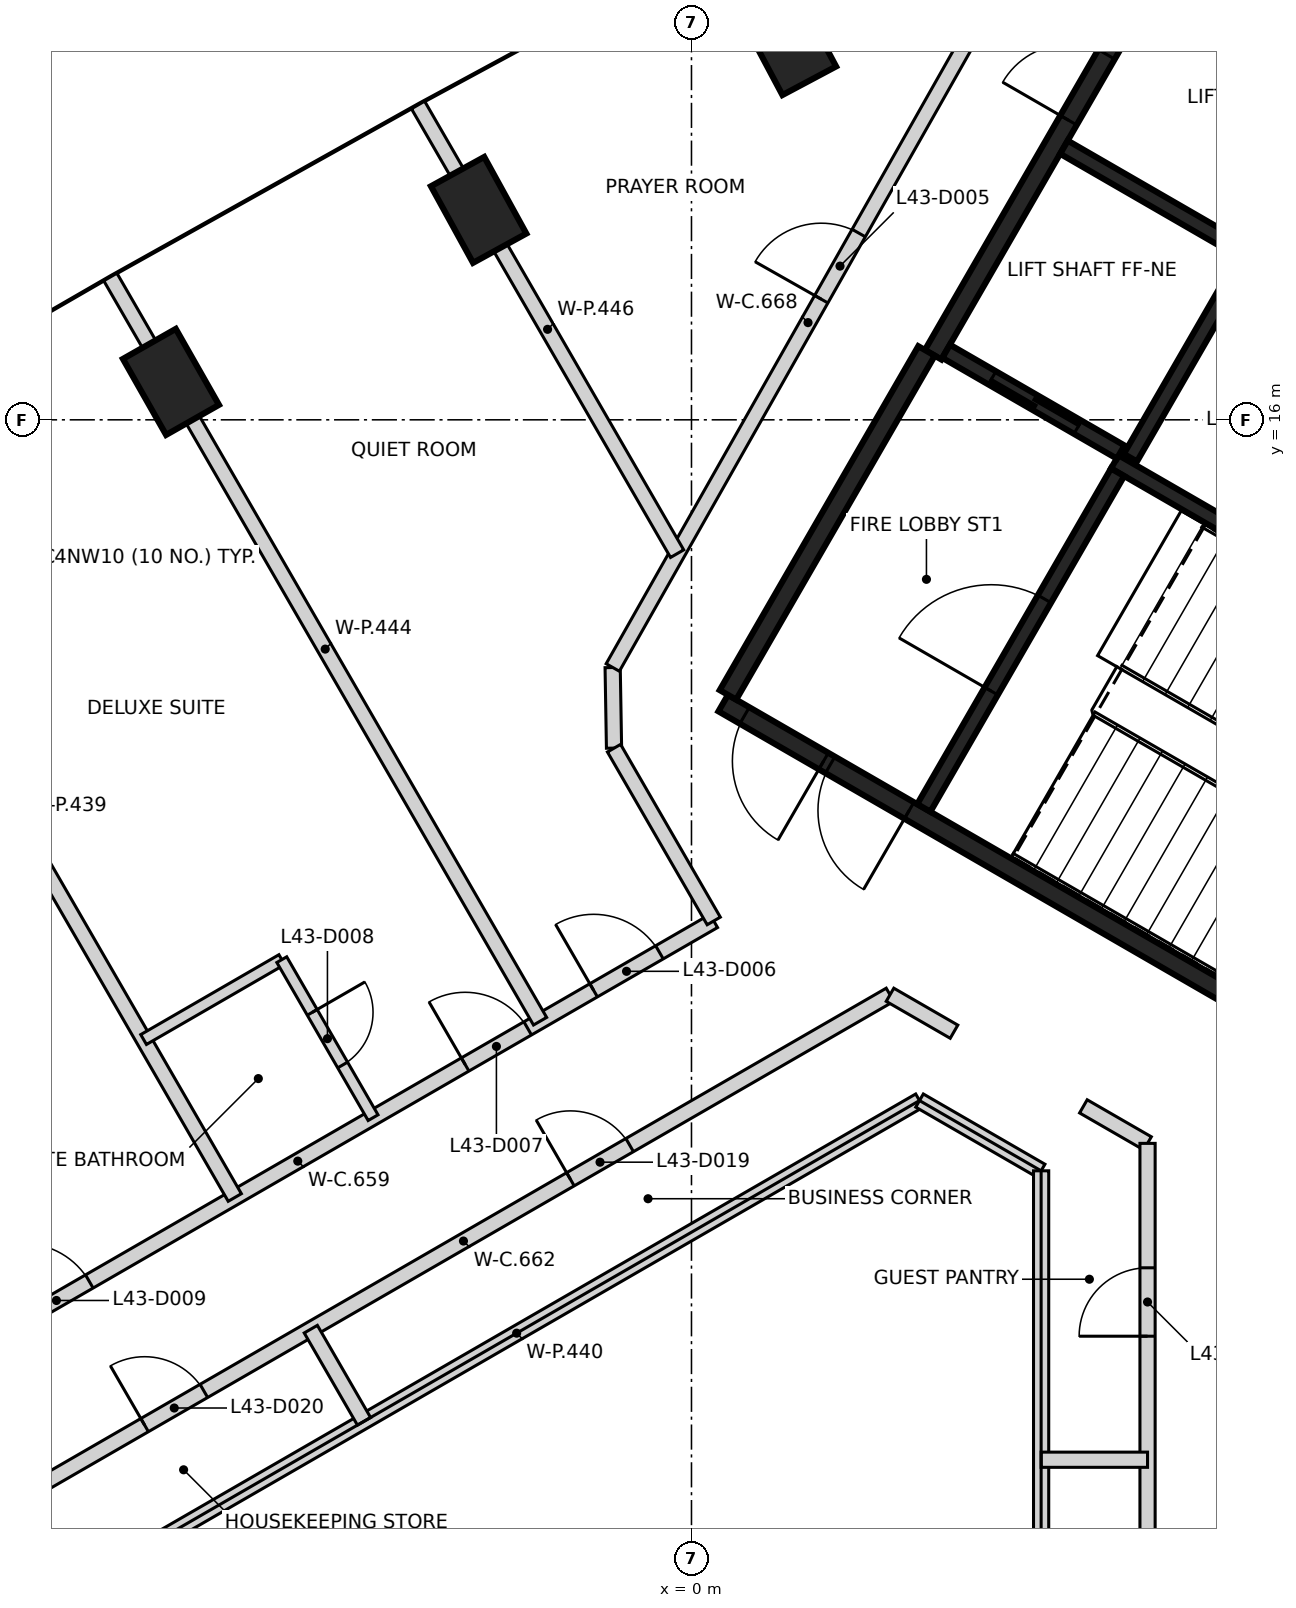
"""IFC4 building model, lengths in metres.
Left out: names, types, materials, properties, quantities, classifications, styles, units other than length and angle.
Written with IfcOpenShell. Run it as: python <this file> out.ifc"""

import sys

from ifc_helpers import new_model, si_unit, direction, frame, frame_2d, origin, origin_2d, place, context, subcontext, project, spatial, rectangle, extrude, element, fill, save


model = new_model("IFC4")
c1 = context("Model", 3, precision=1e-05, world=origin(), true_north=direction((0.0, 1.0)))
c2 = subcontext(c1, "Body", "Model", "MODEL_VIEW")
j1 = project(units=[si_unit("LENGTHUNIT", "METRE"), si_unit("PLANEANGLEUNIT", "RADIAN")], contexts=[c1])
p1 = place(None, origin())
s1 = spatial("IfcSite", under=j1, at=p1, CompositionType="ELEMENT")
p2 = place(p1, origin())
s2 = spatial("IfcBuilding", under=s1, at=p2, CompositionType="ELEMENT")
p3 = place(p2, frame((0.0, 0.0, 175.6)))
s3 = spatial("IfcBuildingStorey", under=s2, at=p3, CompositionType="ELEMENT", Elevation=175.6)
for number, where, z_axis, x_axis in (
    (1, (1.279, 20.968, -0.35), (0.0, 0.0, 1.0), (-0.47, 0.883, 0.0)),
    (2, (-2.8, 18.762, -0.35), (0.0, 0.0, 1.0), (-0.482, 0.876, 0.0)),
    (3, (-6.848, 16.499, -0.35), (0.0, 0.0, 1.0), (-0.494, 0.87, 0.0)),
):
    element("IfcColumn", number, at=place(p3, frame(where, z_axis=z_axis, x_axis=x_axis)), inside=s3, PredefinedType="COLUMN", context=c2, shape_type="SweptSolid", body=[
        extrude(rectangle(XDim=1.15, YDim=0.8, at=origin_2d()), origin(), (0.0, 0.0, 1.0), 3.6),
    ])
p4 = place(p3, frame((10.42, 6.498, 0.0), z_axis=(0.0, 0.0, 1.0), x_axis=(-0.866021906294, 0.500006057782, 0.0)))
e4 = element("IfcWall", 4, at=p4, inside=s3, PredefinedType="SHEAR", context=c2, shape_type="SweptSolid", body=[
    extrude(rectangle(XDim=11.55, YDim=0.25, at=frame_2d((5.775, 0.0))), origin(), (0.0, 0.0, 1.0), 3.25),
])
p5 = place(p4, frame((10.025, 0.0, 0.0)))
e5 = element("IfcOpeningElement", 5, at=p5, cuts=e4, PredefinedType="OPENING", context=c2, shape_type="SweptSolid", body=[
    extrude(rectangle(XDim=1.2, YDim=2.1, at=frame_2d((0.6, 1.05))), frame((0.0, 0.135, 0.0), z_axis=(0.0, -1.0, 0.0), x_axis=(1.0, 0.0, 0.0)), (0.0, 0.0, 1.0), 0.27),
])
p6 = place(p4, frame((8.725, 0.0, 0.0)))
e6 = element("IfcOpeningElement", 6, at=p6, cuts=e4, PredefinedType="OPENING", context=c2, shape_type="SweptSolid", body=[
    extrude(rectangle(XDim=1.2, YDim=2.1, at=frame_2d((0.6, 1.05))), frame((0.0, 0.135, 0.0), z_axis=(0.0, -1.0, 0.0), x_axis=(1.0, 0.0, 0.0)), (0.0, 0.0, 1.0), 0.27),
])
p7 = place(p3, frame((3.179, 16.856, 0.0), z_axis=(0.0, 0.0, 1.0), x_axis=(0.500004234368, 0.866022959057, 0.0)))
e7 = element("IfcWall", 7, at=p7, inside=s3, PredefinedType="SHEAR", context=c2, shape_type="SweptSolid", body=[
    extrude(rectangle(XDim=6.25, YDim=0.25, at=frame_2d((3.125, 0.0))), origin(), (0.0, 0.0, 1.0), 3.25),
])
p8 = place(p7, frame((3.563, 0.0, 0.0)))
e8 = element("IfcOpeningElement", 8, at=p8, cuts=e7, PredefinedType="OPENING", context=c2, shape_type="SweptSolid", body=[
    extrude(rectangle(XDim=1.0, YDim=2.1, at=frame_2d((0.5, 1.05))), frame((0.0, 0.135, 0.0), z_axis=(0.0, -1.0, 0.0), x_axis=(1.0, 0.0, 0.0)), (0.0, 0.0, 1.0), 0.27),
])
p9 = place(p3, frame((0.48, 12.381, 0.0), z_axis=(0.0, 0.0, 1.0), x_axis=(0.49999885962, 0.866026062182, 0.0)))
e9 = element("IfcWall", 9, at=p9, inside=s3, PredefinedType="SHEAR", context=c2, shape_type="SweptSolid", body=[
    extrude(rectangle(XDim=5.225, YDim=0.25, at=frame_2d((2.612, 0.0))), origin(), (0.0, 0.0, 1.0), 3.25),
])
p10 = place(p3, frame((10.636, 12.521, 0.0), z_axis=(0.0, 0.0, 1.0), x_axis=(-0.866013252188, 0.500021046592, 0.0)))
e10 = element("IfcWall", 10, at=p10, inside=s3, PredefinedType="SHEAR", context=c2, shape_type="SweptSolid", body=[
    extrude(rectangle(XDim=5.851, YDim=0.2, at=frame_2d((2.925, 0.0))), origin(), (0.0, 0.0, 1.0), 3.25),
])
p11 = place(p3, frame((3.057, 10.895, 0.0), z_axis=(0.0, 0.0, 1.0), x_axis=(0.500027839223, 0.866009330205, 0.0)))
e11 = element("IfcWall", 11, at=p11, inside=s3, PredefinedType="SHEAR", context=c2, shape_type="SweptSolid", body=[
    extrude(rectangle(XDim=5.098, YDim=0.2, at=frame_2d((2.549, 0.0))), origin(), (0.0, 0.0, 1.0), 3.25),
])
p12 = place(p11, frame((1.774, 0.0, 0.0)))
e12 = element("IfcOpeningElement", 12, at=p12, cuts=e11, PredefinedType="OPENING", context=c2, shape_type="SweptSolid", body=[
    extrude(rectangle(XDim=1.4, YDim=2.1, at=frame_2d((0.7, 1.05))), frame((0.0, 0.11, 0.0), z_axis=(0.0, -1.0, 0.0), x_axis=(1.0, 0.0, 0.0)), (0.0, 0.0, 1.0), 0.22),
])
p13 = place(p3, frame((7.324, 18.187, 0.0), z_axis=(0.0, 0.0, 1.0), x_axis=(-0.499967891604, -0.866043940782, 0.0)))
e13 = element("IfcWall", 13, at=p13, inside=s3, PredefinedType="SHEAR", context=c2, shape_type="SweptSolid", body=[
    extrude(rectangle(XDim=3.1, YDim=0.2, at=frame_2d((1.55, 0.0))), origin(), (0.0, 0.0, 1.0), 3.25),
])
p14 = place(p3, frame((5.646, 15.576, 0.0), z_axis=(0.0, 0.0, 1.0), x_axis=(-0.866018407898, 0.500012117035, 0.0)))
e14 = element("IfcWall", 14, at=p14, inside=s3, PredefinedType="SHEAR", context=c2, shape_type="SweptSolid", body=[
    extrude(rectangle(XDim=2.651, YDim=0.2, at=frame_2d((1.325, 0.0))), origin(), (0.0, 0.0, 1.0), 3.25),
])
p15 = place(p14, frame((0.652, 0.0, 0.0)))
e15 = element("IfcOpeningElement", 15, at=p15, cuts=e14, PredefinedType="OPENING", context=c2, shape_type="SweptSolid", body=[
    extrude(rectangle(XDim=1.3, YDim=2.1, at=frame_2d((0.65, 1.05))), frame((0.0, 0.11, 0.0), z_axis=(0.0, -1.0, 0.0), x_axis=(1.0, 0.0, 0.0)), (0.0, 0.0, 1.0), 0.22),
])
p16 = place(p3, frame((7.196, 18.26, 0.0), z_axis=(0.0, 0.0, 1.0), x_axis=(-0.866018407898, 0.500012117035, 0.0)))
e16 = element("IfcWall", 16, at=p16, inside=s3, PredefinedType="SHEAR", context=c2, shape_type="SweptSolid", body=[
    extrude(rectangle(XDim=2.651, YDim=0.2, at=frame_2d((1.325, 0.0))), origin(), (0.0, 0.0, 1.0), 3.25),
])
p17 = place(p3, frame((-10.652, 3.088, 0.0), z_axis=(0.0, 0.0, 1.0), x_axis=(0.866031821623, 0.499988883812, 0.0)))
e17 = element("IfcWall", 17, at=p17, inside=s3, PredefinedType="PARTITIONING", context=c2, shape_type="SweptSolid", body=[
    extrude(rectangle(XDim=12.638, YDim=0.2, at=frame_2d((6.319, 0.0))), origin(), (0.0, 0.0, 1.0), 3.25),
])
p18 = place(p17, frame((10.813, 0.0, 0.0)))
e18 = element("IfcOpeningElement", 18, at=p18, cuts=e17, PredefinedType="OPENING", context=c2, shape_type="SweptSolid", body=[
    extrude(rectangle(XDim=1.0, YDim=2.1, at=frame_2d((0.5, 1.05))), frame((0.0, 0.11, 0.0), z_axis=(0.0, -1.0, 0.0), x_axis=(1.0, 0.0, 0.0)), (0.0, 0.0, 1.0), 0.22),
])
p19 = place(p17, frame((8.862, 0.0, 0.0)))
e19 = element("IfcOpeningElement", 19, at=p19, cuts=e17, PredefinedType="OPENING", context=c2, shape_type="SweptSolid", body=[
    extrude(rectangle(XDim=0.95, YDim=2.1, at=frame_2d((0.475, 1.05))), frame((0.0, 0.11, 0.0), z_axis=(0.0, -1.0, 0.0), x_axis=(1.0, 0.0, 0.0)), (0.0, 0.0, 1.0), 0.22),
])
p20 = place(p17, frame((2.153, 0.0, 0.0)))
e20 = element("IfcOpeningElement", 20, at=p20, cuts=e17, PredefinedType="OPENING", context=c2, shape_type="SweptSolid", body=[
    extrude(rectangle(XDim=1.0, YDim=2.1, at=frame_2d((0.5, 1.05))), frame((0.0, 0.11, 0.0), z_axis=(0.0, -1.0, 0.0), x_axis=(1.0, 0.0, 0.0)), (0.0, 0.0, 1.0), 0.22),
])
p21 = place(p3, frame((-8.612, 1.956, 0.0), z_axis=(0.0, 0.0, 1.0), x_axis=(0.866034386606, 0.499984440973, 0.0)))
e21 = element("IfcWall", 21, at=p21, inside=s3, PredefinedType="PARTITIONING", context=c2, shape_type="SweptSolid", body=[
    extrude(rectangle(XDim=12.96, YDim=0.2, at=frame_2d((6.48, 0.0))), origin(), (0.0, 0.0, 1.0), 3.25),
])
p22 = place(p21, frame((8.105, 0.0, 0.0)))
e22 = element("IfcOpeningElement", 22, at=p22, cuts=e21, PredefinedType="OPENING", context=c2, shape_type="SweptSolid", body=[
    extrude(rectangle(XDim=0.9, YDim=2.1, at=frame_2d((0.45, 1.05))), frame((0.0, 0.11, 0.0), z_axis=(0.0, -1.0, 0.0), x_axis=(1.0, 0.0, 0.0)), (0.0, 0.0, 1.0), 0.22),
])
p23 = place(p21, frame((1.637, 0.0, 0.0)))
e23 = element("IfcOpeningElement", 23, at=p23, cuts=e21, PredefinedType="OPENING", context=c2, shape_type="SweptSolid", body=[
    extrude(rectangle(XDim=0.9, YDim=2.1, at=frame_2d((0.45, 1.05))), frame((0.0, 0.11, 0.0), z_axis=(0.0, -1.0, 0.0), x_axis=(1.0, 0.0, 0.0)), (0.0, 0.0, 1.0), 0.22),
])
p24 = place(p3, frame((-1.037, 12.741, 0.0), z_axis=(0.0, 0.0, 1.0), x_axis=(0.017040362824, -0.999854802476, 0.0)))
e24 = element("IfcWall", 24, at=p24, inside=s3, PredefinedType="PARTITIONING", context=c2, shape_type="SweptSolid", body=[
    extrude(rectangle(XDim=1.06, YDim=0.2, at=frame_2d((0.53, 0.0))), origin(), (0.0, 0.0, 1.0), 3.25),
])
p25 = place(p3, frame((-1.035, 12.742, 0.0), z_axis=(0.0, 0.0, 1.0), x_axis=(0.49267817774, 0.870211591039, 0.0)))
e25 = element("IfcWall", 25, at=p25, inside=s3, PredefinedType="PARTITIONING", context=c2, shape_type="SweptSolid", body=[
    extrude(rectangle(XDim=10.427, YDim=0.2, at=frame_2d((5.214, 0.0))), origin(), (0.0, 0.0, 1.0), 3.25),
])
p26 = place(p25, frame((5.568, 0.0, 0.0)))
e26 = element("IfcOpeningElement", 26, at=p26, cuts=e25, PredefinedType="OPENING", context=c2, shape_type="SweptSolid", body=[
    extrude(rectangle(XDim=1.0, YDim=2.1, at=frame_2d((0.5, 1.05))), frame((0.0, 0.11, 0.0), z_axis=(0.0, -1.0, 0.0), x_axis=(1.0, 0.0, 0.0)), (0.0, 0.0, 1.0), 0.22),
])
p27 = place(p3, frame((-1.019, 11.68, 0.0), z_axis=(0.0, 0.0, 1.0), x_axis=(0.499921088291, -0.866070958688, 0.0)))
e27 = element("IfcWall", 27, at=p27, inside=s3, PredefinedType="PARTITIONING", context=c2, shape_type="SweptSolid", body=[
    extrude(rectangle(XDim=2.625, YDim=0.2, at=frame_2d((1.312, 0.0))), origin(), (0.0, 0.0, 1.0), 3.25),
])
p28 = place(p3, frame((2.612, 8.436, 0.0), z_axis=(0.0, 0.0, 1.0), x_axis=(0.866055964107, -0.499947064232, 0.0)))
e28 = element("IfcWall", 28, at=p28, inside=s3, PredefinedType="PARTITIONING", context=c2, shape_type="SweptSolid", body=[
    extrude(rectangle(XDim=0.972, YDim=0.2, at=frame_2d((0.486, 0.0))), origin(), (0.0, 0.0, 1.0), 3.25),
])
p29 = place(p3, frame((5.156, 6.968, 0.0), z_axis=(0.0, 0.0, 1.0), x_axis=(0.866123013327, -0.49983089719, 0.0)))
e29 = element("IfcWall", 29, at=p29, inside=s3, PredefinedType="PARTITIONING", context=c2, shape_type="SweptSolid", body=[
    extrude(rectangle(XDim=0.974, YDim=0.2, at=frame_2d((0.487, 0.0))), origin(), (0.0, 0.0, 1.0), 3.25),
])
p30 = place(p3, frame((6.0, -6.481, 0.0), z_axis=(0.0, 0.0, 1.0), x_axis=(0.0, 1.0, 0.0)))
e30 = element("IfcWall", 30, at=p30, inside=s3, PredefinedType="PARTITIONING", context=c2, shape_type="SweptSolid", body=[
    extrude(rectangle(XDim=12.962, YDim=0.2, at=frame_2d((6.481, 0.0))), origin(), (0.0, 0.0, 1.0), 3.25),
])
p31 = place(p30, frame((3.956, 0.0, 0.0)))
e31 = element("IfcOpeningElement", 31, at=p31, cuts=e30, PredefinedType="OPENING", context=c2, shape_type="SweptSolid", body=[
    extrude(rectangle(XDim=0.9, YDim=2.1, at=frame_2d((0.45, 1.05))), frame((0.0, 0.11, 0.0), z_axis=(0.0, -1.0, 0.0), x_axis=(1.0, 0.0, 0.0)), (0.0, 0.0, 1.0), 0.22),
])
p32 = place(p30, frame((10.425, 0.0, 0.0)))
e32 = element("IfcOpeningElement", 32, at=p32, cuts=e30, PredefinedType="OPENING", context=c2, shape_type="SweptSolid", body=[
    extrude(rectangle(XDim=0.9, YDim=2.1, at=frame_2d((0.45, 1.05))), frame((0.0, 0.11, 0.0), z_axis=(0.0, -1.0, 0.0), x_axis=(1.0, 0.0, 0.0)), (0.0, 0.0, 1.0), 0.22),
])
p33 = place(p3, frame((-11.661, 15.561, 0.0), z_axis=(0.0, 0.0, 1.0), x_axis=(0.499987250653, -0.866032764498, 0.0)))
e33 = element("IfcWall", 33, at=p33, inside=s3, PredefinedType="PARTITIONING", context=c2, shape_type="SweptSolid", body=[
    extrude(rectangle(XDim=11.306, YDim=0.2, at=frame_2d((5.653, 0.0))), origin(), (0.0, 0.0, 1.0), 3.25),
])
p34 = place(p3, frame((-7.6, 0.924, 0.0), z_axis=(0.0, 0.0, 1.0), x_axis=(0.866028806638, 0.499994106039, 0.0)))
e34 = element("IfcWall", 34, at=p34, inside=s3, PredefinedType="PARTITIONING", context=c2, shape_type="SweptSolid", body=[
    extrude(rectangle(XDim=12.24, YDim=0.2, at=frame_2d((6.12, 0.0))), origin(), (0.0, 0.0, 1.0), 3.25),
])
p35 = place(p3, frame((-7.646, 17.879, 0.0), z_axis=(0.0, 0.0, 1.0), x_axis=(0.500047691386, -0.865997867399, 0.0)))
e35 = element("IfcWall", 35, at=p35, inside=s3, PredefinedType="PARTITIONING", context=c2, shape_type="SweptSolid", body=[
    extrude(rectangle(XDim=11.306, YDim=0.2, at=frame_2d((5.653, 0.0))), origin(), (0.0, 0.0, 1.0), 3.25),
])
p36 = place(p3, frame((-5.008, 4.037, 0.0), z_axis=(0.0, 0.0, 1.0), x_axis=(0.49996389635, -0.866046247233, 0.0)))
e36 = element("IfcWall", 36, at=p36, inside=s3, PredefinedType="PARTITIONING", context=c2, shape_type="SweptSolid", body=[
    extrude(rectangle(XDim=1.4, YDim=0.2, at=frame_2d((0.7, 0.0))), origin(), (0.0, 0.0, 1.0), 3.25),
])
p37 = place(p3, frame((-3.598, 20.142, 0.0), z_axis=(0.0, 0.0, 1.0), x_axis=(0.500075890333, -0.865981584047, 0.0)))
e37 = element("IfcWall", 37, at=p37, inside=s3, PredefinedType="PARTITIONING", context=c2, shape_type="SweptSolid", body=[
    extrude(rectangle(XDim=6.816, YDim=0.2, at=frame_2d((3.408, 0.0))), origin(), (0.0, 0.0, 1.0), 3.25),
])
p38 = place(p3, frame((3.0, 7.044, 0.0), z_axis=(0.0, 0.0, 1.0), x_axis=(0.865875248522, -0.500259986404, 0.0)))
e38 = element("IfcWall", 38, at=p38, inside=s3, PredefinedType="PARTITIONING", context=c2, shape_type="SweptSolid", body=[
    extrude(rectangle(XDim=1.848, YDim=0.2, at=frame_2d((0.924, 0.0))), origin(), (0.0, 0.0, 1.0), 3.25),
])
p39 = place(p3, frame((4.6, -6.12, 0.0), z_axis=(0.0, 0.0, 1.0), x_axis=(0.0, 1.0, 0.0)))
e39 = element("IfcWall", 39, at=p39, inside=s3, PredefinedType="PARTITIONING", context=c2, shape_type="SweptSolid", body=[
    extrude(rectangle(XDim=12.24, YDim=0.2, at=frame_2d((6.12, 0.0))), origin(), (0.0, 0.0, 1.0), 3.25),
])
p40 = place(p3, frame((4.6, 2.319, 0.0), z_axis=(0.0, 0.0, 1.0), x_axis=(1.0, 0.0, 0.0)))
e40 = element("IfcWall", 40, at=p40, inside=s3, PredefinedType="PARTITIONING", context=c2, shape_type="SweptSolid", body=[
    extrude(rectangle(XDim=1.4, YDim=0.2, at=frame_2d((0.7, 0.0))), origin(), (0.0, 0.0, 1.0), 3.25),
])
p41 = place(p3, frame((-7.208, 7.847, 0.0), z_axis=(0.0, 0.0, 1.0), x_axis=(0.865749785376, 0.500477081515, 0.0)))
e41 = element("IfcWall", 41, at=p41, inside=s3, PredefinedType="PARTITIONING", context=c2, shape_type="SweptSolid", body=[
    extrude(rectangle(XDim=2.1, YDim=0.15, at=frame_2d((1.05, 0.0))), origin(), (0.0, 0.0, 1.0), 3.25),
])
p42 = place(p3, frame((-5.39, 8.898, 0.0), z_axis=(0.0, 0.0, 1.0), x_axis=(0.500218298882, -0.865899332177, 0.0)))
e42 = element("IfcWall", 42, at=p42, inside=s3, PredefinedType="PARTITIONING", context=c2, shape_type="SweptSolid", body=[
    extrude(rectangle(XDim=2.401, YDim=0.15, at=frame_2d((1.2, 0.0))), origin(), (0.0, 0.0, 1.0), 3.25),
])
p43 = place(p42, frame((0.801, 0.0, 0.0)))
e43 = element("IfcOpeningElement", 43, at=p43, cuts=e42, PredefinedType="OPENING", context=c2, shape_type="SweptSolid", body=[
    extrude(rectangle(XDim=0.8, YDim=2.1, at=frame_2d((0.4, 1.05))), frame((0.0, 0.085, 0.0), z_axis=(0.0, -1.0, 0.0), x_axis=(1.0, 0.0, 0.0)), (0.0, 0.0, 1.0), 0.17),
])
p44 = place(p15, origin())
e44 = element("IfcDoor", 44, at=p44, inside=s3, OperationType="SLIDING_TO_RIGHT", PredefinedType="DOOR", context=c2, shape_type="SweptSolid", body=[
    extrude(rectangle(XDim=1.3, YDim=2.1, at=frame_2d((0.65, 1.05))), frame((0.0, 0.025, 0.0), z_axis=(0.0, -1.0, 0.0), x_axis=(1.0, 0.0, 0.0)), (0.0, 0.0, 1.0), 0.05),
])
fill(e15, e44)
p45 = place(p8, origin())
e45 = element("IfcDoor", 45, at=p45, inside=s3, OperationType="SINGLE_SWING_LEFT", PredefinedType="DOOR", context=c2, shape_type="SweptSolid", body=[
    extrude(rectangle(XDim=1.0, YDim=2.1, at=frame_2d((0.5, 1.05))), frame((0.0, 0.025, 0.0), z_axis=(0.0, -1.0, 0.0), x_axis=(1.0, 0.0, 0.0)), (0.0, 0.0, 1.0), 0.05),
])
fill(e8, e45)
p46 = place(p5, origin())
e46 = element("IfcDoor", 46, at=p46, inside=s3, OperationType="SINGLE_SWING_LEFT", PredefinedType="DOOR", context=c2, shape_type="SweptSolid", body=[
    extrude(rectangle(XDim=1.2, YDim=2.1, at=frame_2d((0.6, 1.05))), frame((0.0, 0.025, 0.0), z_axis=(0.0, -1.0, 0.0), x_axis=(1.0, 0.0, 0.0)), (0.0, 0.0, 1.0), 0.05),
])
fill(e5, e46)
p47 = place(p6, origin())
e47 = element("IfcDoor", 47, at=p47, inside=s3, OperationType="SINGLE_SWING_RIGHT", PredefinedType="DOOR", context=c2, shape_type="SweptSolid", body=[
    extrude(rectangle(XDim=1.2, YDim=2.1, at=frame_2d((0.6, 1.05))), frame((0.0, 0.025, 0.0), z_axis=(0.0, -1.0, 0.0), x_axis=(1.0, 0.0, 0.0)), (0.0, 0.0, 1.0), 0.05),
])
fill(e6, e47)
p48 = place(p12, origin())
e48 = element("IfcDoor", 48, at=p48, inside=s3, OperationType="SINGLE_SWING_RIGHT", PredefinedType="DOOR", context=c2, shape_type="SweptSolid", body=[
    extrude(rectangle(XDim=1.4, YDim=2.1, at=frame_2d((0.7, 1.05))), frame((0.0, 0.025, 0.0), z_axis=(0.0, -1.0, 0.0), x_axis=(1.0, 0.0, 0.0)), (0.0, 0.0, 1.0), 0.05),
])
fill(e12, e48)
p49 = place(p26, origin())
e49 = element("IfcDoor", 49, at=p49, inside=s3, OperationType="SINGLE_SWING_LEFT", PredefinedType="DOOR", context=c2, shape_type="SweptSolid", body=[
    extrude(rectangle(XDim=1.0, YDim=2.1, at=frame_2d((0.5, 1.05))), frame((0.0, 0.025, 0.0), z_axis=(0.0, -1.0, 0.0), x_axis=(1.0, 0.0, 0.0)), (0.0, 0.0, 1.0), 0.05),
])
fill(e26, e49)
p50 = place(p18, origin())
e50 = element("IfcDoor", 50, at=p50, inside=s3, OperationType="SINGLE_SWING_LEFT", PredefinedType="DOOR", context=c2, shape_type="SweptSolid", body=[
    extrude(rectangle(XDim=1.0, YDim=2.1, at=frame_2d((0.5, 1.05))), frame((0.0, 0.025, 0.0), z_axis=(0.0, -1.0, 0.0), x_axis=(1.0, 0.0, 0.0)), (0.0, 0.0, 1.0), 0.05),
])
fill(e18, e50)
p51 = place(p19, origin())
e51 = element("IfcDoor", 51, at=p51, inside=s3, OperationType="SINGLE_SWING_LEFT", PredefinedType="DOOR", context=c2, shape_type="SweptSolid", body=[
    extrude(rectangle(XDim=0.95, YDim=2.1, at=frame_2d((0.475, 1.05))), frame((0.0, 0.025, 0.0), z_axis=(0.0, -1.0, 0.0), x_axis=(1.0, 0.0, 0.0)), (0.0, 0.0, 1.0), 0.05),
])
fill(e19, e51)
p52 = place(p43, origin())
e52 = element("IfcDoor", 52, at=p52, inside=s3, OperationType="SINGLE_SWING_LEFT", PredefinedType="DOOR", context=c2, shape_type="SweptSolid", body=[
    extrude(rectangle(XDim=0.8, YDim=2.1, at=frame_2d((0.4, 1.05))), frame((0.0, 0.025, 0.0), z_axis=(0.0, -1.0, 0.0), x_axis=(1.0, 0.0, 0.0)), (0.0, 0.0, 1.0), 0.05),
])
fill(e43, e52)
p53 = place(p20, origin())
e53 = element("IfcDoor", 53, at=p53, inside=s3, OperationType="SINGLE_SWING_LEFT", PredefinedType="DOOR", context=c2, shape_type="SweptSolid", body=[
    extrude(rectangle(XDim=1.0, YDim=2.1, at=frame_2d((0.5, 1.05))), frame((0.0, 0.025, 0.0), z_axis=(0.0, -1.0, 0.0), x_axis=(1.0, 0.0, 0.0)), (0.0, 0.0, 1.0), 0.05),
])
fill(e20, e53)
p54 = place(p32, origin())
e54 = element("IfcDoor", 54, at=p54, inside=s3, OperationType="SINGLE_SWING_LEFT", PredefinedType="DOOR", context=c2, shape_type="SweptSolid", body=[
    extrude(rectangle(XDim=0.9, YDim=2.1, at=frame_2d((0.45, 1.05))), frame((0.0, 0.025, 0.0), z_axis=(0.0, -1.0, 0.0), x_axis=(1.0, 0.0, 0.0)), (0.0, 0.0, 1.0), 0.05),
])
fill(e32, e54)
p55 = place(p22, frame((0.9, 0.0, 0.0), z_axis=(0.0, 0.0, 1.0), x_axis=(-1.0, 0.0, 0.0)))
e55 = element("IfcDoor", 55, at=p55, inside=s3, OperationType="SINGLE_SWING_LEFT", PredefinedType="DOOR", context=c2, shape_type="SweptSolid", body=[
    extrude(rectangle(XDim=0.9, YDim=2.1, at=frame_2d((0.45, 1.05))), frame((0.0, 0.025, 0.0), z_axis=(0.0, -1.0, 0.0), x_axis=(1.0, 0.0, 0.0)), (0.0, 0.0, 1.0), 0.05),
])
fill(e22, e55)
p56 = place(p23, frame((0.9, 0.0, 0.0), z_axis=(0.0, 0.0, 1.0), x_axis=(-1.0, 0.0, 0.0)))
e56 = element("IfcDoor", 56, at=p56, inside=s3, OperationType="SINGLE_SWING_LEFT", PredefinedType="DOOR", context=c2, shape_type="SweptSolid", body=[
    extrude(rectangle(XDim=0.9, YDim=2.1, at=frame_2d((0.45, 1.05))), frame((0.0, 0.025, 0.0), z_axis=(0.0, -1.0, 0.0), x_axis=(1.0, 0.0, 0.0)), (0.0, 0.0, 1.0), 0.05),
])
fill(e23, e56)
save(model, sys.argv[1])
